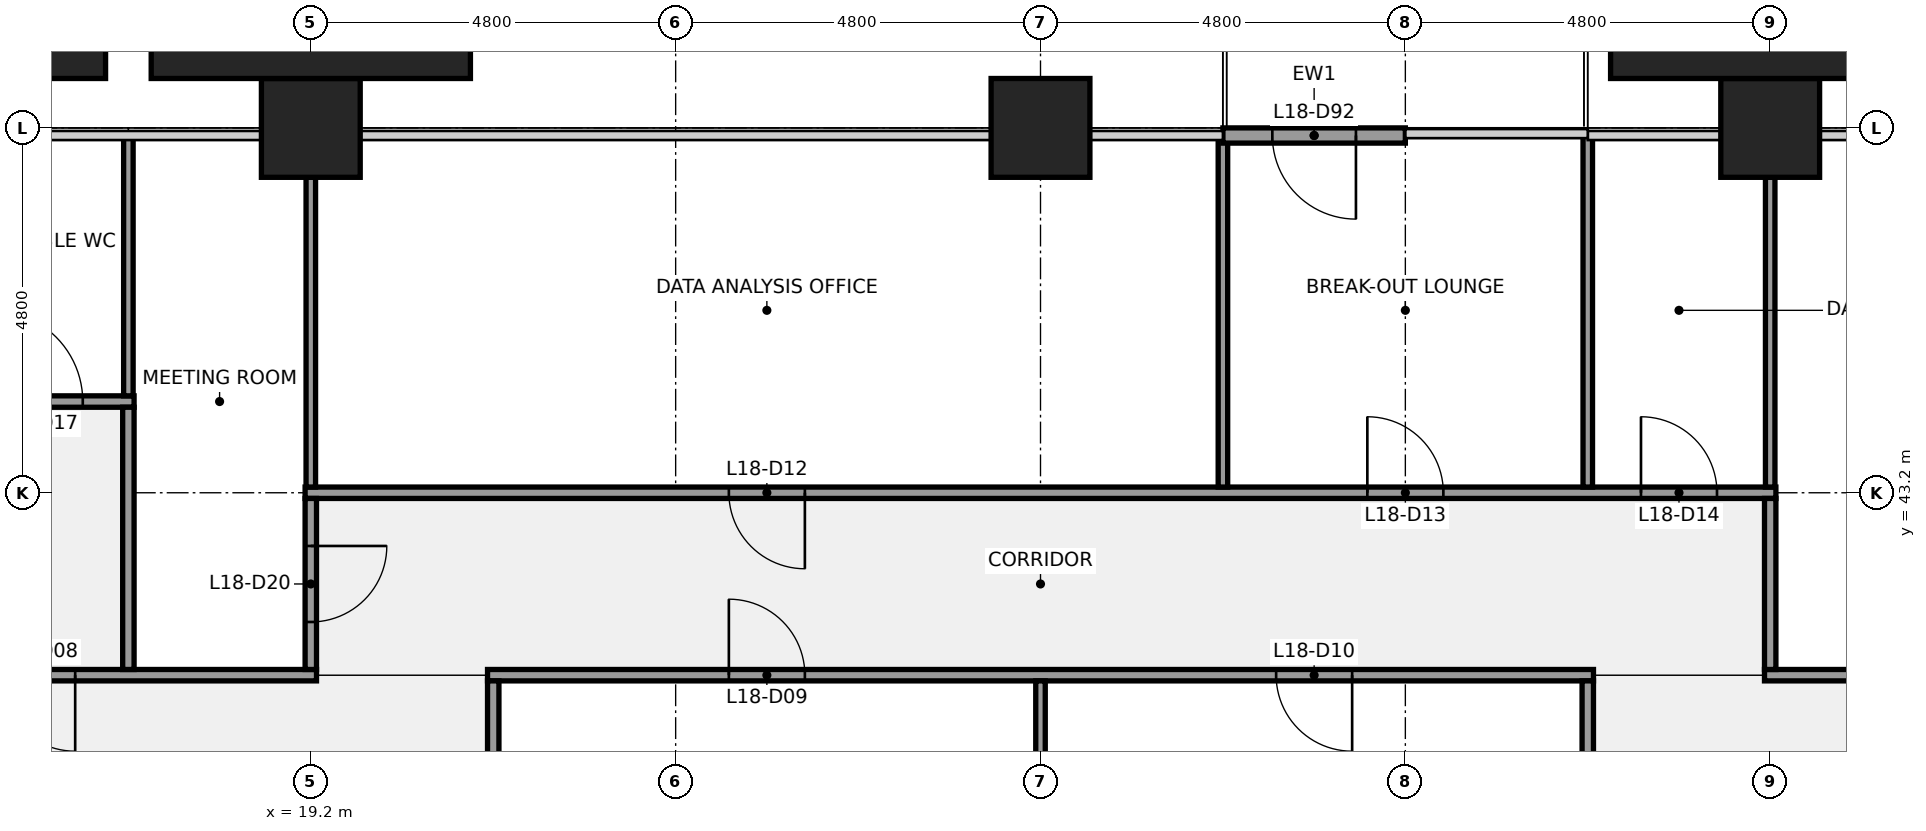
"""IFC4 building model, lengths in metres.
Left out: names, types, materials, properties, quantities, classifications, styles, units other than length and angle.
Written with IfcOpenShell. Run it as: python <this file> out.ifc"""

import sys

from ifc_helpers import new_model, si_unit, direction, frame, frame_2d, origin, origin_2d, place, context, subcontext, project, spatial, rectangle, extrude, element, fill, save


model = new_model("IFC4")
c1 = context("Model", 3, precision=1e-05, world=origin(), true_north=direction((0.0, 1.0)))
c2 = subcontext(c1, "Body", "Model", "MODEL_VIEW")
j1 = project(units=[si_unit("LENGTHUNIT", "METRE"), si_unit("PLANEANGLEUNIT", "RADIAN")], contexts=[c1])
p1 = place(None, origin())
s1 = spatial("IfcSite", under=j1, at=p1, CompositionType="ELEMENT")
p2 = place(p1, origin())
s2 = spatial("IfcBuilding", under=s1, at=p2, CompositionType="ELEMENT")
p3 = place(p2, frame((0.0, 0.0, 83.0)))
s3 = spatial("IfcBuildingStorey", under=s2, at=p3, CompositionType="ELEMENT", Elevation=83.0)
for number, where, z_axis, x_axis in (
    (1, (19.2, 48.0, 0.0), (0.0, 0.0, 1.0), (1.0, 0.0, 0.0)),
    (2, (28.8, 48.0, 0.0), (0.0, 0.0, 1.0), (1.0, 0.0, 0.0)),
    (3, (38.4, 48.0, 0.0), (0.0, 0.0, 1.0), (1.0, 0.0, 0.0)),
):
    element("IfcColumn", number, at=place(p3, frame(where, z_axis=z_axis, x_axis=x_axis)), inside=s3, PredefinedType="COLUMN", context=c2, shape_type="SweptSolid", body=[
        extrude(rectangle(XDim=1.3, YDim=1.3, at=origin_2d()), origin(), (0.0, 0.0, 1.0), 4.0),
    ])
p4 = place(p3, frame((9.525, 40.8, 0.0), z_axis=(0.0, 0.0, 1.0), x_axis=(1.0, 0.0, 0.0)))
e4 = element("IfcWall", 4, at=p4, inside=s3, PredefinedType="PARTITIONING", context=c2, shape_type="SweptSolid", body=[
    extrude(rectangle(XDim=9.75, YDim=0.15, at=frame_2d((4.875, 0.0))), origin(), (0.0, 0.0, 1.0), 2.709),
])
p5 = place(p4, frame((5.575, 0.0, 0.0)))
e5 = element("IfcOpeningElement", 5, at=p5, cuts=e4, PredefinedType="OPENING", context=c2, shape_type="SweptSolid", body=[
    extrude(rectangle(XDim=1.0, YDim=2.1, at=frame_2d((0.5, 1.05))), frame((0.0, 0.085, 0.0), z_axis=(0.0, -1.0, 0.0), x_axis=(1.0, 0.0, 0.0)), (0.0, 0.0, 1.0), 0.17),
])
p6 = place(p3, frame((21.525, 40.8, 0.0), z_axis=(0.0, 0.0, 1.0), x_axis=(1.0, 0.0, 0.0)))
e6 = element("IfcWall", 6, at=p6, inside=s3, PredefinedType="PARTITIONING", context=c2, shape_type="SweptSolid", body=[
    extrude(rectangle(XDim=14.55, YDim=0.15, at=frame_2d((7.275, 0.0))), origin(), (0.0, 0.0, 1.0), 2.709),
])
p7 = place(p6, frame((3.175, 0.0, 0.0)))
e7 = element("IfcOpeningElement", 7, at=p7, cuts=e6, PredefinedType="OPENING", context=c2, shape_type="SweptSolid", body=[
    extrude(rectangle(XDim=1.0, YDim=2.1, at=frame_2d((0.5, 1.05))), frame((0.0, 0.085, 0.0), z_axis=(0.0, -1.0, 0.0), x_axis=(1.0, 0.0, 0.0)), (0.0, 0.0, 1.0), 0.17),
])
p8 = place(p6, frame((10.375, 0.0, 0.0)))
e8 = element("IfcOpeningElement", 8, at=p8, cuts=e6, PredefinedType="OPENING", context=c2, shape_type="SweptSolid", body=[
    extrude(rectangle(XDim=1.0, YDim=2.1, at=frame_2d((0.5, 1.05))), frame((0.0, 0.085, 0.0), z_axis=(0.0, -1.0, 0.0), x_axis=(1.0, 0.0, 0.0)), (0.0, 0.0, 1.0), 0.17),
])
p9 = place(p3, frame((38.325, 40.8, 0.0), z_axis=(0.0, 0.0, 1.0), x_axis=(1.0, 0.0, 0.0)))
e9 = element("IfcWall", 9, at=p9, inside=s3, PredefinedType="PARTITIONING", context=c2, shape_type="SweptSolid", body=[
    extrude(rectangle(XDim=4.95, YDim=0.15, at=frame_2d((2.475, 0.0))), origin(), (0.0, 0.0, 1.0), 2.709),
])
p10 = place(p9, frame((1.975, 0.0, 0.0)))
e10 = element("IfcOpeningElement", 10, at=p10, cuts=e9, PredefinedType="OPENING", context=c2, shape_type="SweptSolid", body=[
    extrude(rectangle(XDim=1.0, YDim=2.1, at=frame_2d((0.5, 1.05))), frame((0.0, 0.085, 0.0), z_axis=(0.0, -1.0, 0.0), x_axis=(1.0, 0.0, 0.0)), (0.0, 0.0, 1.0), 0.17),
])
p11 = place(p3, frame((19.125, 43.2, 0.0), z_axis=(0.0, 0.0, 1.0), x_axis=(1.0, 0.0, 0.0)))
e11 = element("IfcWall", 11, at=p11, inside=s3, PredefinedType="PARTITIONING", context=c2, shape_type="SweptSolid", body=[
    extrude(rectangle(XDim=19.35, YDim=0.15, at=frame_2d((9.675, 0.0))), origin(), (0.0, 0.0, 1.0), 2.709),
])
p12 = place(p11, frame((5.575, 0.0, 0.0)))
e12 = element("IfcOpeningElement", 12, at=p12, cuts=e11, PredefinedType="OPENING", context=c2, shape_type="SweptSolid", body=[
    extrude(rectangle(XDim=1.0, YDim=2.1, at=frame_2d((0.5, 1.05))), frame((0.0, 0.085, 0.0), z_axis=(0.0, -1.0, 0.0), x_axis=(1.0, 0.0, 0.0)), (0.0, 0.0, 1.0), 0.17),
])
p13 = place(p11, frame((13.975, 0.0, 0.0)))
e13 = element("IfcOpeningElement", 13, at=p13, cuts=e11, PredefinedType="OPENING", context=c2, shape_type="SweptSolid", body=[
    extrude(rectangle(XDim=1.0, YDim=2.1, at=frame_2d((0.5, 1.05))), frame((0.0, 0.085, 0.0), z_axis=(0.0, -1.0, 0.0), x_axis=(1.0, 0.0, 0.0)), (0.0, 0.0, 1.0), 0.17),
])
p14 = place(p11, frame((17.575, 0.0, 0.0)))
e14 = element("IfcOpeningElement", 14, at=p14, cuts=e11, PredefinedType="OPENING", context=c2, shape_type="SweptSolid", body=[
    extrude(rectangle(XDim=1.0, YDim=2.1, at=frame_2d((0.5, 1.05))), frame((0.0, 0.085, 0.0), z_axis=(0.0, -1.0, 0.0), x_axis=(1.0, 0.0, 0.0)), (0.0, 0.0, 1.0), 0.17),
])
p15 = place(p3, frame((9.7, 44.4, 0.0), z_axis=(0.0, 0.0, 1.0), x_axis=(1.0, 0.0, 0.0)))
e15 = element("IfcWall", 15, at=p15, inside=s3, PredefinedType="PARTITIONING", context=c2, shape_type="SweptSolid", body=[
    extrude(rectangle(XDim=7.175, YDim=0.15, at=frame_2d((3.587, 0.0))), origin(), (0.0, 0.0, 1.0), 2.709),
])
p16 = place(p15, frame((0.7, 0.0, 0.0)))
e16 = element("IfcOpeningElement", 16, at=p16, cuts=e15, PredefinedType="OPENING", context=c2, shape_type="SweptSolid", body=[
    extrude(rectangle(XDim=0.9, YDim=2.1, at=frame_2d((0.45, 1.05))), frame((0.0, 0.085, 0.0), z_axis=(0.0, -1.0, 0.0), x_axis=(1.0, 0.0, 0.0)), (0.0, 0.0, 1.0), 0.17),
])
p17 = place(p15, frame((3.05, 0.0, 0.0)))
e17 = element("IfcOpeningElement", 17, at=p17, cuts=e15, PredefinedType="OPENING", context=c2, shape_type="SweptSolid", body=[
    extrude(rectangle(XDim=0.9, YDim=2.1, at=frame_2d((0.45, 1.05))), frame((0.0, 0.085, 0.0), z_axis=(0.0, -1.0, 0.0), x_axis=(1.0, 0.0, 0.0)), (0.0, 0.0, 1.0), 0.17),
])
p18 = place(p15, frame((5.3, 0.0, 0.0)))
e18 = element("IfcOpeningElement", 18, at=p18, cuts=e15, PredefinedType="OPENING", context=c2, shape_type="SweptSolid", body=[
    extrude(rectangle(XDim=1.2, YDim=2.1, at=frame_2d((0.6, 1.05))), frame((0.0, 0.085, 0.0), z_axis=(0.0, -1.0, 0.0), x_axis=(1.0, 0.0, 0.0)), (0.0, 0.0, 1.0), 0.17),
])
p19 = place(p3, frame((16.8, 44.475, 0.0), z_axis=(0.0, 0.0, 1.0), x_axis=(0.0, 1.0, 0.0)))
e19 = element("IfcWall", 19, at=p19, inside=s3, PredefinedType="PARTITIONING", context=c2, shape_type="SweptSolid", body=[
    extrude(rectangle(XDim=3.425, YDim=0.125, at=frame_2d((1.712, 0.0))), origin(), (0.0, 0.0, 1.0), 2.709),
])
p20 = place(p3, frame((16.8, 40.875, 0.0), z_axis=(0.0, 0.0, 1.0), x_axis=(0.0, 1.0, 0.0)))
e20 = element("IfcWall", 20, at=p20, inside=s3, PredefinedType="PARTITIONING", context=c2, shape_type="SweptSolid", body=[
    extrude(rectangle(XDim=3.45, YDim=0.15, at=frame_2d((1.725, 0.0))), origin(), (0.0, 0.0, 1.0), 2.709),
])
p21 = place(p3, frame((19.2, 43.275, 0.0), z_axis=(0.0, 0.0, 1.0), x_axis=(0.0, 1.0, 0.0)))
e21 = element("IfcWall", 21, at=p21, inside=s3, PredefinedType="PARTITIONING", context=c2, shape_type="SweptSolid", body=[
    extrude(rectangle(XDim=4.075, YDim=0.125, at=frame_2d((2.038, 0.0))), origin(), (0.0, 0.0, 1.0), 2.709),
])
p22 = place(p3, frame((19.2, 40.875, 0.0), z_axis=(0.0, 0.0, 1.0), x_axis=(0.0, 1.0, 0.0)))
e22 = element("IfcWall", 22, at=p22, inside=s3, PredefinedType="PARTITIONING", context=c2, shape_type="SweptSolid", body=[
    extrude(rectangle(XDim=2.25, YDim=0.15, at=frame_2d((1.125, 0.0))), origin(), (0.0, 0.0, 1.0), 2.709),
])
p23 = place(p22, frame((0.625, 0.0, 0.0)))
e23 = element("IfcOpeningElement", 23, at=p23, cuts=e22, PredefinedType="OPENING", context=c2, shape_type="SweptSolid", body=[
    extrude(rectangle(XDim=1.0, YDim=2.1, at=frame_2d((0.5, 1.05))), frame((0.0, 0.085, 0.0), z_axis=(0.0, -1.0, 0.0), x_axis=(1.0, 0.0, 0.0)), (0.0, 0.0, 1.0), 0.17),
])
p24 = place(p3, frame((21.6, 34.863, 0.0), z_axis=(0.0, 0.0, 1.0), x_axis=(0.0, 1.0, 0.0)))
e24 = element("IfcWall", 24, at=p24, inside=s3, PredefinedType="PARTITIONING", context=c2, shape_type="SweptSolid", body=[
    extrude(rectangle(XDim=5.863, YDim=0.15, at=frame_2d((2.931, 0.0))), origin(), (0.0, 0.0, 1.0), 2.709),
])
p25 = place(p3, frame((28.8, 34.863, 0.0), z_axis=(0.0, 0.0, 1.0), x_axis=(0.0, 1.0, 0.0)))
e25 = element("IfcWall", 25, at=p25, inside=s3, PredefinedType="PARTITIONING", context=c2, shape_type="SweptSolid", body=[
    extrude(rectangle(XDim=5.863, YDim=0.125, at=frame_2d((2.931, 0.0))), origin(), (0.0, 0.0, 1.0), 2.709),
])
for number, where, z_axis, x_axis in (
    (26, (31.2, 43.275, 0.0), (0.0, 0.0, 1.0), (0.0, 1.0, 0.0)),
    (27, (36.0, 43.275, 0.0), (0.0, 0.0, 1.0), (0.0, 1.0, 0.0)),
):
    element("IfcWall", number, at=place(p3, frame(where, z_axis=z_axis, x_axis=x_axis)), inside=s3, PredefinedType="PARTITIONING", context=c2, shape_type="SweptSolid", body=[
        extrude(rectangle(XDim=4.625, YDim=0.125, at=frame_2d((2.312, 0.0))), origin(), (0.0, 0.0, 1.0), 2.709),
    ])
p26 = place(p3, frame((36.0, 34.863, 0.0), z_axis=(0.0, 0.0, 1.0), x_axis=(0.0, 1.0, 0.0)))
e28 = element("IfcWall", 28, at=p26, inside=s3, PredefinedType="PARTITIONING", context=c2, shape_type="SweptSolid", body=[
    extrude(rectangle(XDim=5.863, YDim=0.15, at=frame_2d((2.931, 0.0))), origin(), (0.0, 0.0, 1.0), 2.709),
])
p27 = place(p3, frame((38.4, 43.275, 0.0), z_axis=(0.0, 0.0, 1.0), x_axis=(0.0, 1.0, 0.0)))
e29 = element("IfcWall", 29, at=p27, inside=s3, PredefinedType="PARTITIONING", context=c2, shape_type="SweptSolid", body=[
    extrude(rectangle(XDim=4.075, YDim=0.125, at=frame_2d((2.038, 0.0))), origin(), (0.0, 0.0, 1.0), 2.709),
])
p28 = place(p3, frame((38.4, 40.875, 0.0), z_axis=(0.0, 0.0, 1.0), x_axis=(0.0, 1.0, 0.0)))
e30 = element("IfcWall", 30, at=p28, inside=s3, PredefinedType="PARTITIONING", context=c2, shape_type="SweptSolid", body=[
    extrude(rectangle(XDim=2.25, YDim=0.15, at=frame_2d((1.125, 0.0))), origin(), (0.0, 0.0, 1.0), 2.709),
])
p29 = place(p3, frame((33.6, 47.9, 0.0), z_axis=(0.0, 0.0, 1.0), x_axis=(-1.0, 0.0, 0.0)))
e31 = element("IfcWall", 31, at=p29, inside=s3, PredefinedType="SOLIDWALL", context=c2, shape_type="SweptSolid", body=[
    extrude(rectangle(XDim=2.4, YDim=0.2, at=frame_2d((1.2, 0.0))), origin(), (0.0, 0.0, 1.0), 3.301),
])
p30 = place(p29, frame((0.65, 0.0, 0.0)))
e32 = element("IfcOpeningElement", 32, at=p30, cuts=e31, PredefinedType="OPENING", context=c2, shape_type="SweptSolid", body=[
    extrude(rectangle(XDim=1.1, YDim=2.1, at=frame_2d((0.55, 1.05))), frame((0.0, 0.11, 0.0), z_axis=(0.0, -1.0, 0.0), x_axis=(1.0, 0.0, 0.0)), (0.0, 0.0, 1.0), 0.22),
])
for number, where, z_axis, x_axis in (
    (33, (14.4, 49.075, 0.0), (0.0, 0.0, 1.0), (1.0, 0.0, 0.0)),
    (34, (19.2, 49.075, 0.0), (0.0, 0.0, 1.0), (1.0, 0.0, 0.0)),
    (35, (38.4, 49.075, 0.0), (0.0, 0.0, 1.0), (1.0, 0.0, 0.0)),
):
    element("IfcColumn", number, at=place(p3, frame(where, z_axis=z_axis, x_axis=x_axis)), inside=s3, PredefinedType="PILASTER", context=c2, shape_type="SweptSolid", body=[
        extrude(rectangle(XDim=4.2, YDim=0.85, at=origin_2d()), origin(), (0.0, 0.0, 1.0), 4.0),
    ])
p31 = place(p5, origin())
e36 = element("IfcDoor", 36, at=p31, inside=s3, OperationType="SINGLE_SWING_RIGHT", PredefinedType="DOOR", context=c2, shape_type="SweptSolid", body=[
    extrude(rectangle(XDim=1.0, YDim=2.1, at=frame_2d((0.5, 1.05))), frame((0.0, 0.025, 0.0), z_axis=(0.0, -1.0, 0.0), x_axis=(1.0, 0.0, 0.0)), (0.0, 0.0, 1.0), 0.05),
])
fill(e5, e36)
p32 = place(p7, origin())
e37 = element("IfcDoor", 37, at=p32, inside=s3, OperationType="SINGLE_SWING_LEFT", PredefinedType="DOOR", context=c2, shape_type="SweptSolid", body=[
    extrude(rectangle(XDim=1.0, YDim=2.1, at=frame_2d((0.5, 1.05))), frame((0.0, 0.025, 0.0), z_axis=(0.0, -1.0, 0.0), x_axis=(1.0, 0.0, 0.0)), (0.0, 0.0, 1.0), 0.05),
])
fill(e7, e37)
p33 = place(p8, origin())
e38 = element("IfcDoor", 38, at=p33, inside=s3, OperationType="SINGLE_SWING_RIGHT", PredefinedType="DOOR", context=c2, shape_type="SweptSolid", body=[
    extrude(rectangle(XDim=1.0, YDim=2.1, at=frame_2d((0.5, 1.05))), frame((0.0, 0.025, 0.0), z_axis=(0.0, -1.0, 0.0), x_axis=(1.0, 0.0, 0.0)), (0.0, 0.0, 1.0), 0.05),
])
fill(e8, e38)
p34 = place(p12, origin())
e39 = element("IfcDoor", 39, at=p34, inside=s3, OperationType="SINGLE_SWING_RIGHT", PredefinedType="DOOR", context=c2, shape_type="SweptSolid", body=[
    extrude(rectangle(XDim=1.0, YDim=2.1, at=frame_2d((0.5, 1.05))), frame((0.0, 0.025, 0.0), z_axis=(0.0, -1.0, 0.0), x_axis=(1.0, 0.0, 0.0)), (0.0, 0.0, 1.0), 0.05),
])
fill(e12, e39)
p35 = place(p13, origin())
e40 = element("IfcDoor", 40, at=p35, inside=s3, OperationType="SINGLE_SWING_LEFT", PredefinedType="DOOR", context=c2, shape_type="SweptSolid", body=[
    extrude(rectangle(XDim=1.0, YDim=2.1, at=frame_2d((0.5, 1.05))), frame((0.0, 0.025, 0.0), z_axis=(0.0, -1.0, 0.0), x_axis=(1.0, 0.0, 0.0)), (0.0, 0.0, 1.0), 0.05),
])
fill(e13, e40)
p36 = place(p14, origin())
e41 = element("IfcDoor", 41, at=p36, inside=s3, OperationType="SINGLE_SWING_LEFT", PredefinedType="DOOR", context=c2, shape_type="SweptSolid", body=[
    extrude(rectangle(XDim=1.0, YDim=2.1, at=frame_2d((0.5, 1.05))), frame((0.0, 0.025, 0.0), z_axis=(0.0, -1.0, 0.0), x_axis=(1.0, 0.0, 0.0)), (0.0, 0.0, 1.0), 0.05),
])
fill(e14, e41)
p37 = place(p18, origin())
e42 = element("IfcDoor", 42, at=p37, inside=s3, OperationType="SINGLE_SWING_LEFT", PredefinedType="DOOR", context=c2, shape_type="SweptSolid", body=[
    extrude(rectangle(XDim=1.2, YDim=2.1, at=frame_2d((0.6, 1.05))), frame((0.0, 0.025, 0.0), z_axis=(0.0, -1.0, 0.0), x_axis=(1.0, 0.0, 0.0)), (0.0, 0.0, 1.0), 0.05),
])
fill(e18, e42)
p38 = place(p23, origin())
e43 = element("IfcDoor", 43, at=p38, inside=s3, OperationType="SINGLE_SWING_RIGHT", PredefinedType="DOOR", context=c2, shape_type="SweptSolid", body=[
    extrude(rectangle(XDim=1.0, YDim=2.1, at=frame_2d((0.5, 1.05))), frame((0.0, 0.025, 0.0), z_axis=(0.0, -1.0, 0.0), x_axis=(1.0, 0.0, 0.0)), (0.0, 0.0, 1.0), 0.05),
])
fill(e23, e43)
p39 = place(p30, origin())
e44 = element("IfcDoor", 44, at=p39, inside=s3, OperationType="SINGLE_SWING_LEFT", PredefinedType="DOOR", context=c2, shape_type="SweptSolid", body=[
    extrude(rectangle(XDim=1.1, YDim=2.1, at=frame_2d((0.55, 1.05))), frame((0.0, 0.025, 0.0), z_axis=(0.0, -1.0, 0.0), x_axis=(1.0, 0.0, 0.0)), (0.0, 0.0, 1.0), 0.05),
])
fill(e32, e44)
save(model, sys.argv[1])
